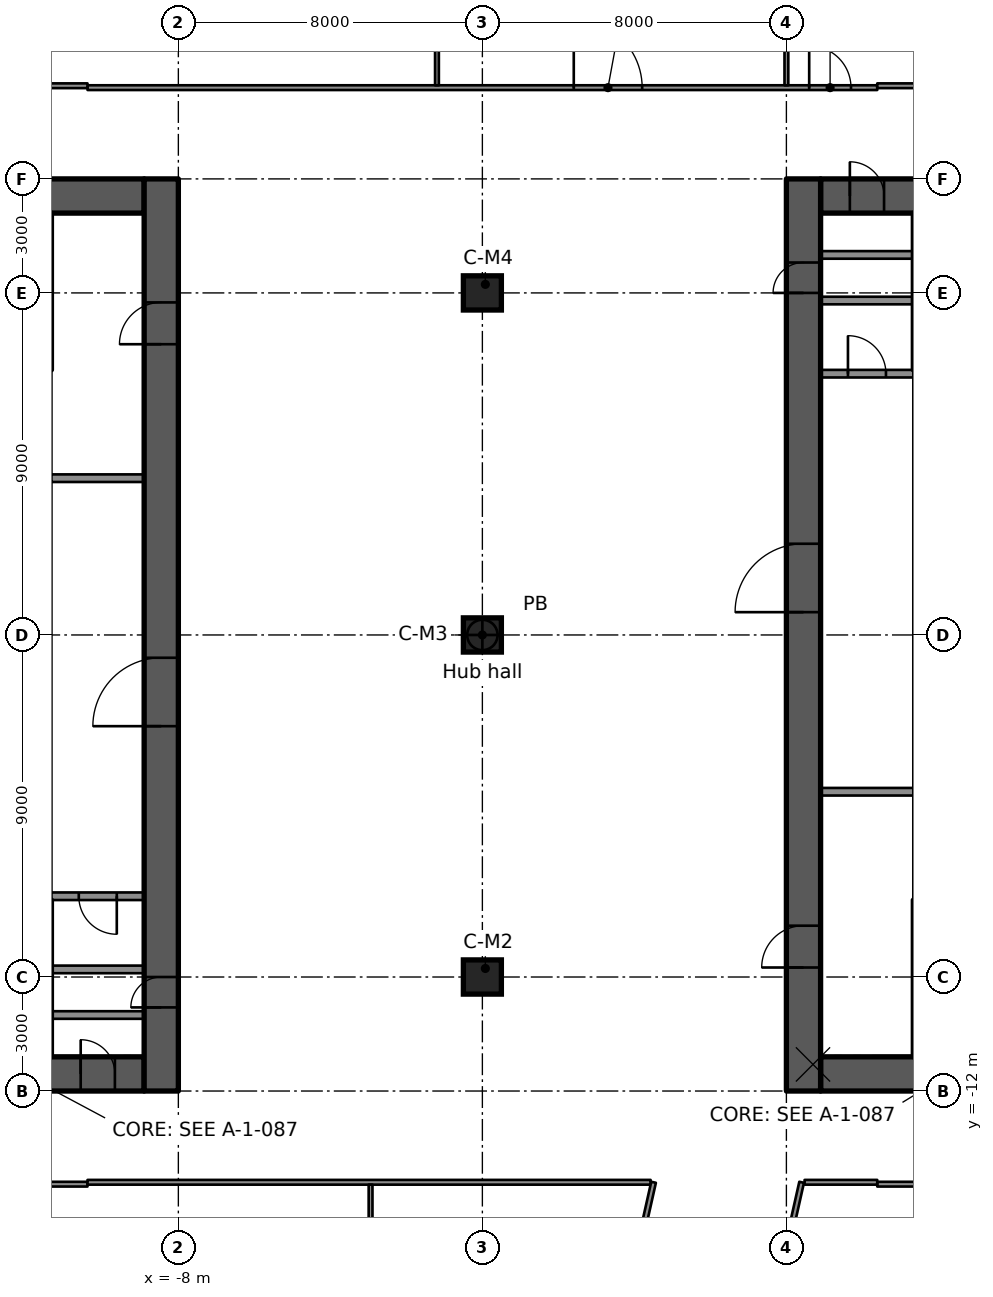
"""IFC4 building model, lengths in metres.
Left out: names, types, materials, properties, quantities, classifications, styles, units other than length and angle.
Written with IfcOpenShell. Run it as: python <this file> out.ifc"""

import sys

from ifc_helpers import new_model, si_unit, direction, frame, frame_2d, origin, origin_2d, place, context, subcontext, project, spatial, rectangle, extrude, element, fill, save


model = new_model("IFC4")
c1 = context("Model", 3, precision=1e-05, world=origin(), true_north=direction((0.0, 1.0)))
c2 = subcontext(c1, "Body", "Model", "MODEL_VIEW")
j1 = project(units=[si_unit("LENGTHUNIT", "METRE"), si_unit("PLANEANGLEUNIT", "RADIAN")], contexts=[c1])
p1 = place(None, origin())
s1 = spatial("IfcSite", under=j1, at=p1, CompositionType="ELEMENT")
p2 = place(p1, origin())
s2 = spatial("IfcBuilding", under=s1, at=p2, CompositionType="ELEMENT")
p3 = place(p2, frame((0.0, 0.0, 156.1)))
s3 = spatial("IfcBuildingStorey", under=s2, at=p3, CompositionType="ELEMENT", Elevation=156.1)
p4 = place(p3, frame((-18.1, 11.55, 0.0), z_axis=(0.0, 0.0, 1.0), x_axis=(1.0, 0.0, 0.0)))
e1 = element("IfcWall", 1, at=p4, inside=s3, PredefinedType="SHEAR", context=c2, shape_type="SweptSolid", body=[
    extrude(rectangle(XDim=9.2, YDim=0.9, at=frame_2d((4.6, 0.0))), origin(), (0.0, 0.0, 1.0), 3.5),
])
p5 = place(p4, frame((5.1, 0.0, 0.0)))
e2 = element("IfcOpeningElement", 2, at=p5, cuts=e1, PredefinedType="OPENING", context=c2, shape_type="SweptSolid", body=[
    extrude(rectangle(XDim=1.1, YDim=2.1, at=frame_2d((0.55, 1.05))), frame((0.0, 0.46, 0.0), z_axis=(0.0, -1.0, 0.0), x_axis=(1.0, 0.0, 0.0)), (0.0, 0.0, 1.0), 0.92),
])
p6 = place(p3, frame((-18.1, -11.55, 0.0), z_axis=(0.0, 0.0, 1.0), x_axis=(1.0, 0.0, 0.0)))
e3 = element("IfcWall", 3, at=p6, inside=s3, PredefinedType="SHEAR", context=c2, shape_type="SweptSolid", body=[
    extrude(rectangle(XDim=9.2, YDim=0.9, at=frame_2d((4.6, 0.0))), origin(), (0.0, 0.0, 1.0), 3.5),
])
p7 = place(p6, frame((5.1, 0.0, 0.0)))
e4 = element("IfcOpeningElement", 4, at=p7, cuts=e3, PredefinedType="OPENING", context=c2, shape_type="SweptSolid", body=[
    extrude(rectangle(XDim=1.1, YDim=2.1, at=frame_2d((0.55, 1.05))), frame((0.0, 0.46, 0.0), z_axis=(0.0, -1.0, 0.0), x_axis=(1.0, 0.0, 0.0)), (0.0, 0.0, 1.0), 0.92),
])
p8 = place(p6, frame((7.53, 0.0, 0.0)))
e5 = element("IfcOpeningElement", 5, at=p8, cuts=e3, PredefinedType="OPENING", context=c2, shape_type="SweptSolid", body=[
    extrude(rectangle(XDim=0.9, YDim=2.1, at=frame_2d((0.45, 1.05))), frame((0.0, 0.46, 0.0), z_axis=(0.0, -1.0, 0.0), x_axis=(1.0, 0.0, 0.0)), (0.0, 0.0, 1.0), 0.92),
])
p9 = place(p3, frame((-8.45, -12.0, 0.0), z_axis=(0.0, 0.0, 1.0), x_axis=(0.0, 1.0, 0.0)))
e6 = element("IfcWall", 6, at=p9, inside=s3, PredefinedType="SHEAR", context=c2, shape_type="SweptSolid", body=[
    extrude(rectangle(XDim=24.0, YDim=0.9, at=frame_2d((12.0, 0.0))), origin(), (0.0, 0.0, 1.0), 3.5),
])
p10 = place(p9, frame((9.6, 0.0, 0.0)))
e7 = element("IfcOpeningElement", 7, at=p10, cuts=e6, PredefinedType="OPENING", context=c2, shape_type="SweptSolid", body=[
    extrude(rectangle(XDim=1.8, YDim=2.1, at=frame_2d((0.9, 1.05))), frame((0.0, 0.46, 0.0), z_axis=(0.0, -1.0, 0.0), x_axis=(1.0, 0.0, 0.0)), (0.0, 0.0, 1.0), 0.92),
])
p11 = place(p9, frame((19.65, 0.0, 0.0)))
e8 = element("IfcOpeningElement", 8, at=p11, cuts=e6, PredefinedType="OPENING", context=c2, shape_type="SweptSolid", body=[
    extrude(rectangle(XDim=1.1, YDim=2.1, at=frame_2d((0.55, 1.05))), frame((0.0, 0.46, 0.0), z_axis=(0.0, -1.0, 0.0), x_axis=(1.0, 0.0, 0.0)), (0.0, 0.0, 1.0), 0.92),
])
p12 = place(p9, frame((2.2, 0.0, 0.0)))
e9 = element("IfcOpeningElement", 9, at=p12, cuts=e6, PredefinedType="OPENING", context=c2, shape_type="SweptSolid", body=[
    extrude(rectangle(XDim=0.8, YDim=2.1, at=frame_2d((0.4, 1.05))), frame((0.0, 0.46, 0.0), z_axis=(0.0, -1.0, 0.0), x_axis=(1.0, 0.0, 0.0)), (0.0, 0.0, 1.0), 0.92),
])
p13 = place(p3, frame((8.9, 11.55, 0.0), z_axis=(0.0, 0.0, 1.0), x_axis=(1.0, 0.0, 0.0)))
e10 = element("IfcWall", 10, at=p13, inside=s3, PredefinedType="SHEAR", context=c2, shape_type="SweptSolid", body=[
    extrude(rectangle(XDim=9.2, YDim=0.9, at=frame_2d((4.6, 0.0))), origin(), (0.0, 0.0, 1.0), 3.5),
])
p14 = place(p13, frame((3.0, 0.0, 0.0)))
e11 = element("IfcOpeningElement", 11, at=p14, cuts=e10, PredefinedType="OPENING", context=c2, shape_type="SweptSolid", body=[
    extrude(rectangle(XDim=1.1, YDim=2.1, at=frame_2d((0.55, 1.05))), frame((0.0, 0.46, 0.0), z_axis=(0.0, -1.0, 0.0), x_axis=(1.0, 0.0, 0.0)), (0.0, 0.0, 1.0), 0.92),
])
p15 = place(p13, frame((0.77, 0.0, 0.0)))
e12 = element("IfcOpeningElement", 12, at=p15, cuts=e10, PredefinedType="OPENING", context=c2, shape_type="SweptSolid", body=[
    extrude(rectangle(XDim=0.9, YDim=2.1, at=frame_2d((0.45, 1.05))), frame((0.0, 0.46, 0.0), z_axis=(0.0, -1.0, 0.0), x_axis=(1.0, 0.0, 0.0)), (0.0, 0.0, 1.0), 0.92),
])
p16 = place(p3, frame((8.9, -11.55, 0.0), z_axis=(0.0, 0.0, 1.0), x_axis=(1.0, 0.0, 0.0)))
e13 = element("IfcWall", 13, at=p16, inside=s3, PredefinedType="SHEAR", context=c2, shape_type="SweptSolid", body=[
    extrude(rectangle(XDim=9.2, YDim=0.9, at=frame_2d((4.6, 0.0))), origin(), (0.0, 0.0, 1.0), 3.5),
])
p17 = place(p16, frame((3.0, 0.0, 0.0)))
e14 = element("IfcOpeningElement", 14, at=p17, cuts=e13, PredefinedType="OPENING", context=c2, shape_type="SweptSolid", body=[
    extrude(rectangle(XDim=1.1, YDim=2.1, at=frame_2d((0.55, 1.05))), frame((0.0, 0.46, 0.0), z_axis=(0.0, -1.0, 0.0), x_axis=(1.0, 0.0, 0.0)), (0.0, 0.0, 1.0), 0.92),
])
p18 = place(p3, frame((8.45, -12.0, 0.0), z_axis=(0.0, 0.0, 1.0), x_axis=(0.0, 1.0, 0.0)))
e15 = element("IfcWall", 15, at=p18, inside=s3, PredefinedType="SHEAR", context=c2, shape_type="SweptSolid", body=[
    extrude(rectangle(XDim=24.0, YDim=0.9, at=frame_2d((12.0, 0.0))), origin(), (0.0, 0.0, 1.0), 3.5),
])
p19 = place(p18, frame((12.6, 0.0, 0.0)))
e16 = element("IfcOpeningElement", 16, at=p19, cuts=e15, PredefinedType="OPENING", context=c2, shape_type="SweptSolid", body=[
    extrude(rectangle(XDim=1.8, YDim=2.1, at=frame_2d((0.9, 1.05))), frame((0.0, 0.46, 0.0), z_axis=(0.0, -1.0, 0.0), x_axis=(1.0, 0.0, 0.0)), (0.0, 0.0, 1.0), 0.92),
])
p20 = place(p18, frame((3.25, 0.0, 0.0)))
e17 = element("IfcOpeningElement", 17, at=p20, cuts=e15, PredefinedType="OPENING", context=c2, shape_type="SweptSolid", body=[
    extrude(rectangle(XDim=1.1, YDim=2.1, at=frame_2d((0.55, 1.05))), frame((0.0, 0.46, 0.0), z_axis=(0.0, -1.0, 0.0), x_axis=(1.0, 0.0, 0.0)), (0.0, 0.0, 1.0), 0.92),
])
p21 = place(p18, frame((21.0, 0.0, 0.0)))
e18 = element("IfcOpeningElement", 18, at=p21, cuts=e15, PredefinedType="OPENING", context=c2, shape_type="SweptSolid", body=[
    extrude(rectangle(XDim=0.8, YDim=2.1, at=frame_2d((0.4, 1.05))), frame((0.0, 0.46, 0.0), z_axis=(0.0, -1.0, 0.0), x_axis=(1.0, 0.0, 0.0)), (0.0, 0.0, 1.0), 0.92),
])
for number, where, z_axis, x_axis in (
    (19, (0.0, -9.0, 0.0), (0.0, 0.0, 1.0), (1.0, 0.0, 0.0)),
    (20, (0.0, 0.0, 0.0), (0.0, 0.0, 1.0), (1.0, 0.0, 0.0)),
    (21, (0.0, 9.0, 0.0), (0.0, 0.0, 1.0), (1.0, 0.0, 0.0)),
):
    element("IfcColumn", number, at=place(p3, frame(where, z_axis=z_axis, x_axis=x_axis)), inside=s3, PredefinedType="COLUMN", context=c2, shape_type="SweptSolid", body=[
        extrude(rectangle(XDim=1.0, YDim=0.9, at=origin_2d()), origin(), (0.0, 0.0, 1.0), 3.5),
    ])
p22 = place(p3, frame((-8.9, 4.125, 0.0), z_axis=(0.0, 0.0, 1.0), x_axis=(-1.0, 0.0, 0.0)))
e22 = element("IfcWall", 22, at=p22, inside=s3, PredefinedType="PARTITIONING", context=c2, shape_type="SweptSolid", body=[
    extrude(rectangle(XDim=2.44, YDim=0.2, at=frame_2d((1.22, 0.0))), origin(), (0.0, 0.0, 1.0), 3.09),
])
p23 = place(p3, frame((-8.9, -6.875, 0.0), z_axis=(0.0, 0.0, 1.0), x_axis=(-1.0, 0.0, 0.0)))
e23 = element("IfcWall", 23, at=p23, inside=s3, PredefinedType="PARTITIONING", context=c2, shape_type="SweptSolid", body=[
    extrude(rectangle(XDim=2.44, YDim=0.2, at=frame_2d((1.22, 0.0))), origin(), (0.0, 0.0, 1.0), 3.09),
])
p24 = place(p23, frame((0.72, 0.0, 0.0)))
e24 = element("IfcOpeningElement", 24, at=p24, cuts=e23, PredefinedType="OPENING", context=c2, shape_type="SweptSolid", body=[
    extrude(rectangle(XDim=1.0, YDim=2.1, at=frame_2d((0.5, 1.05))), frame((0.0, 0.11, 0.0), z_axis=(0.0, -1.0, 0.0), x_axis=(1.0, 0.0, 0.0)), (0.0, 0.0, 1.0), 0.22),
])
for number, where, z_axis, x_axis in (
    (25, (-8.9, -10.0, 0.0), (0.0, 0.0, 1.0), (-1.0, 0.0, 0.0)),
    (26, (-8.9, -8.8, 0.0), (0.0, 0.0, 1.0), (-1.0, 0.0, 0.0)),
    (27, (8.9, -4.125, 0.0), (0.0, 0.0, 1.0), (1.0, 0.0, 0.0)),
):
    element("IfcWall", number, at=place(p3, frame(where, z_axis=z_axis, x_axis=x_axis)), inside=s3, PredefinedType="PARTITIONING", context=c2, shape_type="SweptSolid", body=[
        extrude(rectangle(XDim=2.44, YDim=0.2, at=frame_2d((1.22, 0.0))), origin(), (0.0, 0.0, 1.0), 3.09),
    ])
p25 = place(p3, frame((8.9, 6.875, 0.0), z_axis=(0.0, 0.0, 1.0), x_axis=(1.0, 0.0, 0.0)))
e28 = element("IfcWall", 28, at=p25, inside=s3, PredefinedType="PARTITIONING", context=c2, shape_type="SweptSolid", body=[
    extrude(rectangle(XDim=2.44, YDim=0.2, at=frame_2d((1.22, 0.0))), origin(), (0.0, 0.0, 1.0), 3.09),
])
p26 = place(p25, frame((0.72, 0.0, 0.0)))
e29 = element("IfcOpeningElement", 29, at=p26, cuts=e28, PredefinedType="OPENING", context=c2, shape_type="SweptSolid", body=[
    extrude(rectangle(XDim=1.0, YDim=2.1, at=frame_2d((0.5, 1.05))), frame((0.0, 0.11, 0.0), z_axis=(0.0, -1.0, 0.0), x_axis=(1.0, 0.0, 0.0)), (0.0, 0.0, 1.0), 0.22),
])
for number, where, z_axis, x_axis in (
    (30, (8.9, 10.0, 0.0), (0.0, 0.0, 1.0), (1.0, 0.0, 0.0)),
    (31, (8.9, 8.8, 0.0), (0.0, 0.0, 1.0), (1.0, 0.0, 0.0)),
):
    element("IfcWall", number, at=place(p3, frame(where, z_axis=z_axis, x_axis=x_axis)), inside=s3, PredefinedType="PARTITIONING", context=c2, shape_type="SweptSolid", body=[
        extrude(rectangle(XDim=2.44, YDim=0.2, at=frame_2d((1.22, 0.0))), origin(), (0.0, 0.0, 1.0), 3.09),
    ])
p27 = place(p3, frame((-10.391, -14.451, 0.0), z_axis=(0.0, 0.0, 1.0), x_axis=(-1.0, 0.0, 0.0)))
e32 = element("IfcWall", 32, at=p27, inside=s3, PredefinedType="PARTITIONING", context=c2, shape_type="SweptSolid", body=[
    extrude(rectangle(XDim=5.043, YDim=0.125, at=frame_2d((2.521, 0.0))), origin(), (0.0, 0.0, 1.0), 3.08),
])
p28 = place(p27, frame((2.1, 0.0, 0.0)))
e33 = element("IfcOpeningElement", 33, at=p28, cuts=e32, PredefinedType="OPENING", context=c2, shape_type="SweptSolid", body=[
    extrude(rectangle(XDim=0.9, YDim=2.1, at=frame_2d((0.45, 1.05))), frame((0.0, 0.073, 0.0), z_axis=(0.0, -1.0, 0.0), x_axis=(1.0, 0.0, 0.0)), (0.0, 0.0, 1.0), 0.145),
])
p29 = place(p3, frame((21.387, -14.451, 0.0), z_axis=(0.0, 0.0, 1.0), x_axis=(-1.0, 0.0, 0.0)))
e34 = element("IfcWall", 34, at=p29, inside=s3, PredefinedType="PARTITIONING", context=c2, shape_type="SweptSolid", body=[
    extrude(rectangle(XDim=10.996, YDim=0.125, at=frame_2d((5.498, 0.0))), origin(), (0.0, 0.0, 1.0), 3.08),
])
p30 = place(p29, frame((7.816, 0.0, 0.0)))
e35 = element("IfcOpeningElement", 35, at=p30, cuts=e34, PredefinedType="OPENING", context=c2, shape_type="SweptSolid", body=[
    extrude(rectangle(XDim=0.9, YDim=2.1, at=frame_2d((0.45, 1.05))), frame((0.0, 0.073, 0.0), z_axis=(0.0, -1.0, 0.0), x_axis=(1.0, 0.0, 0.0)), (0.0, 0.0, 1.0), 0.145),
])
p31 = place(p29, frame((2.288, 0.0, 0.0)))
e36 = element("IfcOpeningElement", 36, at=p31, cuts=e34, PredefinedType="OPENING", context=c2, shape_type="SweptSolid", body=[
    extrude(rectangle(XDim=0.9, YDim=2.1, at=frame_2d((0.45, 1.05))), frame((0.0, 0.073, 0.0), z_axis=(0.0, -1.0, 0.0), x_axis=(1.0, 0.0, 0.0)), (0.0, 0.0, 1.0), 0.145),
])
p32 = place(p3, frame((-10.39, -14.401, 0.0), z_axis=(0.0, 0.0, 1.0), x_axis=(1.0, 0.0, 0.0)))
e37 = element("IfcWall", 37, at=p32, inside=s3, PredefinedType="PARTITIONING", context=c2, shape_type="SweptSolid", body=[
    extrude(rectangle(XDim=14.817, YDim=0.125, at=frame_2d((7.408, 0.0))), origin(), (0.0, 0.0, 1.0), 3.08),
])
p33 = place(p3, frame((8.479, -14.401, 0.0), z_axis=(0.0, 0.0, 1.0), x_axis=(1.0, 0.0, 0.0)))
e38 = element("IfcWall", 38, at=p33, inside=s3, PredefinedType="PARTITIONING", context=c2, shape_type="SweptSolid", body=[
    extrude(rectangle(XDim=1.912, YDim=0.125, at=frame_2d((0.956, 0.0))), origin(), (0.0, 0.0, 1.0), 3.08),
])
p34 = place(p3, frame((-10.39, 14.401, 0.0), z_axis=(0.0, 0.0, 1.0), x_axis=(1.0, 0.0, 0.0)))
e39 = element("IfcWall", 39, at=p34, inside=s3, PredefinedType="PARTITIONING", context=c2, shape_type="SweptSolid", body=[
    extrude(rectangle(XDim=20.781, YDim=0.125, at=frame_2d((10.391, 0.0))), origin(), (0.0, 0.0, 1.0), 3.08),
])
p35 = place(p34, frame((18.99, 0.0, 0.0)))
e40 = element("IfcOpeningElement", 40, at=p35, cuts=e39, PredefinedType="OPENING", context=c2, shape_type="SweptSolid", body=[
    extrude(rectangle(XDim=1.1, YDim=2.1, at=frame_2d((0.55, 1.05))), frame((0.0, 0.073, 0.0), z_axis=(0.0, -1.0, 0.0), x_axis=(1.0, 0.0, 0.0)), (0.0, 0.0, 1.0), 0.145),
])
p36 = place(p34, frame((12.795, 0.0, 0.0)))
e41 = element("IfcOpeningElement", 41, at=p36, cuts=e39, PredefinedType="OPENING", context=c2, shape_type="SweptSolid", body=[
    extrude(rectangle(XDim=1.8, YDim=2.1, at=frame_2d((0.9, 1.05))), frame((0.0, 0.073, 0.0), z_axis=(0.0, -1.0, 0.0), x_axis=(1.0, 0.0, 0.0)), (0.0, 0.0, 1.0), 0.145),
])
p37 = place(p3, frame((-21.387, 14.451, 0.0), z_axis=(0.0, 0.0, 1.0), x_axis=(1.0, 0.0, 0.0)))
e42 = element("IfcWall", 42, at=p37, inside=s3, PredefinedType="PARTITIONING", context=c2, shape_type="SweptSolid", body=[
    extrude(rectangle(XDim=10.996, YDim=0.125, at=frame_2d((5.498, 0.0))), origin(), (0.0, 0.0, 1.0), 3.08),
])
p38 = place(p37, frame((7.317, 0.0, 0.0)))
e43 = element("IfcOpeningElement", 43, at=p38, cuts=e42, PredefinedType="OPENING", context=c2, shape_type="SweptSolid", body=[
    extrude(rectangle(XDim=1.8, YDim=2.1, at=frame_2d((0.9, 1.05))), frame((0.0, 0.073, 0.0), z_axis=(0.0, -1.0, 0.0), x_axis=(1.0, 0.0, 0.0)), (0.0, 0.0, 1.0), 0.145),
])
p39 = place(p3, frame((10.391, 14.451, 0.0), z_axis=(0.0, 0.0, 1.0), x_axis=(1.0, 0.0, 0.0)))
e44 = element("IfcWall", 44, at=p39, inside=s3, PredefinedType="PARTITIONING", context=c2, shape_type="SweptSolid", body=[
    extrude(rectangle(XDim=10.996, YDim=0.125, at=frame_2d((5.498, 0.0))), origin(), (0.0, 0.0, 1.0), 3.08),
])
p40 = place(p39, frame((7.38, 0.0, 0.0)))
e45 = element("IfcOpeningElement", 45, at=p40, cuts=e44, PredefinedType="OPENING", context=c2, shape_type="SweptSolid", body=[
    extrude(rectangle(XDim=1.8, YDim=2.1, at=frame_2d((0.9, 1.05))), frame((0.0, 0.073, 0.0), z_axis=(0.0, -1.0, 0.0), x_axis=(1.0, 0.0, 0.0)), (0.0, 0.0, 1.0), 0.145),
])
p41 = place(p3, frame((7.569, -18.107, 0.0), z_axis=(0.0, 0.0, 1.0), x_axis=(0.218992134919, 0.975726624031, 0.0)))
e46 = element("IfcWall", 46, at=p41, inside=s3, PredefinedType="PARTITIONING", context=c2, shape_type="SweptSolid", body=[
    extrude(rectangle(XDim=3.798, YDim=0.125, at=frame_2d((1.899, 0.0))), origin(), (0.0, 0.0, 1.0), 3.08),
])
p42 = place(p3, frame((3.86, -17.274, 0.0), z_axis=(0.0, 0.0, 1.0), x_axis=(0.218975515368, 0.975730353976, 0.0)))
e47 = element("IfcWall", 47, at=p42, inside=s3, PredefinedType="PARTITIONING", context=c2, shape_type="SweptSolid", body=[
    extrude(rectangle(XDim=2.945, YDim=0.125, at=frame_2d((1.472, 0.0))), origin(), (0.0, 0.0, 1.0), 3.08),
])
p43 = place(p3, frame((8.0, 14.463, 0.0), z_axis=(0.0, 0.0, 1.0), x_axis=(0.0, 1.0, 0.0)))
e48 = element("IfcWall", 48, at=p43, inside=s3, PredefinedType="PARTITIONING", context=c2, shape_type="SweptSolid", body=[
    extrude(rectangle(XDim=14.798, YDim=0.1, at=frame_2d((7.399, 0.0))), origin(), (0.0, 0.0, 1.0), 3.08),
])
p44 = place(p3, frame((-1.195, 14.463, 0.0), z_axis=(0.0, 0.0, 1.0), x_axis=(0.0, 1.0, 0.0)))
e49 = element("IfcWall", 49, at=p44, inside=s3, PredefinedType="PARTITIONING", context=c2, shape_type="SweptSolid", body=[
    extrude(rectangle(XDim=16.585, YDim=0.1, at=frame_2d((8.292, 0.0))), origin(), (0.0, 0.0, 1.0), 3.08),
])
p45 = place(p3, frame((-2.942, -31.313, 0.0), z_axis=(0.0, 0.0, 1.0), x_axis=(0.0, 1.0, 0.0)))
e50 = element("IfcWall", 50, at=p45, inside=s3, PredefinedType="PARTITIONING", context=c2, shape_type="SweptSolid", body=[
    extrude(rectangle(XDim=16.85, YDim=0.1, at=frame_2d((8.425, 0.0))), origin(), (0.0, 0.0, 1.0), 3.08),
])
p46 = place(p10, origin())
e51 = element("IfcDoor", 51, at=p46, inside=s3, OperationType="SINGLE_SWING_LEFT", PredefinedType="DOOR", context=c2, shape_type="SweptSolid", body=[
    extrude(rectangle(XDim=1.8, YDim=2.1, at=frame_2d((0.9, 1.05))), frame((0.0, 0.025, 0.0), z_axis=(0.0, -1.0, 0.0), x_axis=(1.0, 0.0, 0.0)), (0.0, 0.0, 1.0), 0.05),
])
fill(e7, e51)
p47 = place(p11, origin())
e52 = element("IfcDoor", 52, at=p47, inside=s3, OperationType="SINGLE_SWING_RIGHT", PredefinedType="DOOR", context=c2, shape_type="SweptSolid", body=[
    extrude(rectangle(XDim=1.1, YDim=2.1, at=frame_2d((0.55, 1.05))), frame((0.0, 0.025, 0.0), z_axis=(0.0, -1.0, 0.0), x_axis=(1.0, 0.0, 0.0)), (0.0, 0.0, 1.0), 0.05),
])
fill(e8, e52)
p48 = place(p8, origin())
e53 = element("IfcDoor", 53, at=p48, inside=s3, OperationType="SINGLE_SWING_RIGHT", PredefinedType="DOOR", context=c2, shape_type="SweptSolid", body=[
    extrude(rectangle(XDim=0.9, YDim=2.1, at=frame_2d((0.45, 1.05))), frame((0.0, 0.025, 0.0), z_axis=(0.0, -1.0, 0.0), x_axis=(1.0, 0.0, 0.0)), (0.0, 0.0, 1.0), 0.05),
])
fill(e5, e53)
p49 = place(p12, origin())
e54 = element("IfcDoor", 54, at=p49, inside=s3, OperationType="SINGLE_SWING_LEFT", PredefinedType="DOOR", context=c2, shape_type="SweptSolid", body=[
    extrude(rectangle(XDim=0.8, YDim=2.1, at=frame_2d((0.4, 1.05))), frame((0.0, 0.025, 0.0), z_axis=(0.0, -1.0, 0.0), x_axis=(1.0, 0.0, 0.0)), (0.0, 0.0, 1.0), 0.05),
])
fill(e9, e54)
p50 = place(p24, origin())
e55 = element("IfcDoor", 55, at=p50, inside=s3, OperationType="SINGLE_SWING_RIGHT", PredefinedType="DOOR", context=c2, shape_type="SweptSolid", body=[
    extrude(rectangle(XDim=1.0, YDim=2.1, at=frame_2d((0.5, 1.05))), frame((0.0, 0.025, 0.0), z_axis=(0.0, -1.0, 0.0), x_axis=(1.0, 0.0, 0.0)), (0.0, 0.0, 1.0), 0.05),
])
fill(e24, e55)
p51 = place(p19, origin())
e56 = element("IfcDoor", 56, at=p51, inside=s3, OperationType="SINGLE_SWING_RIGHT", PredefinedType="DOOR", context=c2, shape_type="SweptSolid", body=[
    extrude(rectangle(XDim=1.8, YDim=2.1, at=frame_2d((0.9, 1.05))), frame((0.0, 0.025, 0.0), z_axis=(0.0, -1.0, 0.0), x_axis=(1.0, 0.0, 0.0)), (0.0, 0.0, 1.0), 0.05),
])
fill(e16, e56)
p52 = place(p20, origin())
e57 = element("IfcDoor", 57, at=p52, inside=s3, OperationType="SINGLE_SWING_LEFT", PredefinedType="DOOR", context=c2, shape_type="SweptSolid", body=[
    extrude(rectangle(XDim=1.1, YDim=2.1, at=frame_2d((0.55, 1.05))), frame((0.0, 0.025, 0.0), z_axis=(0.0, -1.0, 0.0), x_axis=(1.0, 0.0, 0.0)), (0.0, 0.0, 1.0), 0.05),
])
fill(e17, e57)
p53 = place(p15, origin())
e58 = element("IfcDoor", 58, at=p53, inside=s3, OperationType="SINGLE_SWING_LEFT", PredefinedType="DOOR", context=c2, shape_type="SweptSolid", body=[
    extrude(rectangle(XDim=0.9, YDim=2.1, at=frame_2d((0.45, 1.05))), frame((0.0, 0.025, 0.0), z_axis=(0.0, -1.0, 0.0), x_axis=(1.0, 0.0, 0.0)), (0.0, 0.0, 1.0), 0.05),
])
fill(e12, e58)
p54 = place(p21, origin())
e59 = element("IfcDoor", 59, at=p54, inside=s3, OperationType="SINGLE_SWING_RIGHT", PredefinedType="DOOR", context=c2, shape_type="SweptSolid", body=[
    extrude(rectangle(XDim=0.8, YDim=2.1, at=frame_2d((0.4, 1.05))), frame((0.0, 0.025, 0.0), z_axis=(0.0, -1.0, 0.0), x_axis=(1.0, 0.0, 0.0)), (0.0, 0.0, 1.0), 0.05),
])
fill(e18, e59)
p55 = place(p26, origin())
e60 = element("IfcDoor", 60, at=p55, inside=s3, OperationType="SINGLE_SWING_RIGHT", PredefinedType="DOOR", context=c2, shape_type="SweptSolid", body=[
    extrude(rectangle(XDim=1.0, YDim=2.1, at=frame_2d((0.5, 1.05))), frame((0.0, 0.025, 0.0), z_axis=(0.0, -1.0, 0.0), x_axis=(1.0, 0.0, 0.0)), (0.0, 0.0, 1.0), 0.05),
])
fill(e29, e60)
p56 = place(p35, origin())
e61 = element("IfcDoor", 61, at=p56, inside=s3, OperationType="SINGLE_SWING_RIGHT", PredefinedType="DOOR", context=c2, shape_type="SweptSolid", body=[
    extrude(rectangle(XDim=1.1, YDim=2.1, at=frame_2d((0.55, 1.05))), frame((0.0, 0.025, 0.0), z_axis=(0.0, -1.0, 0.0), x_axis=(1.0, 0.0, 0.0)), (0.0, 0.0, 1.0), 0.05),
])
fill(e40, e61)
p57 = place(p36, origin())
e62 = element("IfcDoor", 62, at=p57, inside=s3, OperationType="DOUBLE_DOOR_SINGLE_SWING", PredefinedType="DOOR", context=c2, shape_type="SweptSolid", body=[
    extrude(rectangle(XDim=1.8, YDim=2.1, at=frame_2d((0.9, 1.05))), frame((0.0, 0.025, 0.0), z_axis=(0.0, -1.0, 0.0), x_axis=(1.0, 0.0, 0.0)), (0.0, 0.0, 1.0), 0.05),
])
fill(e41, e62)
save(model, sys.argv[1])
